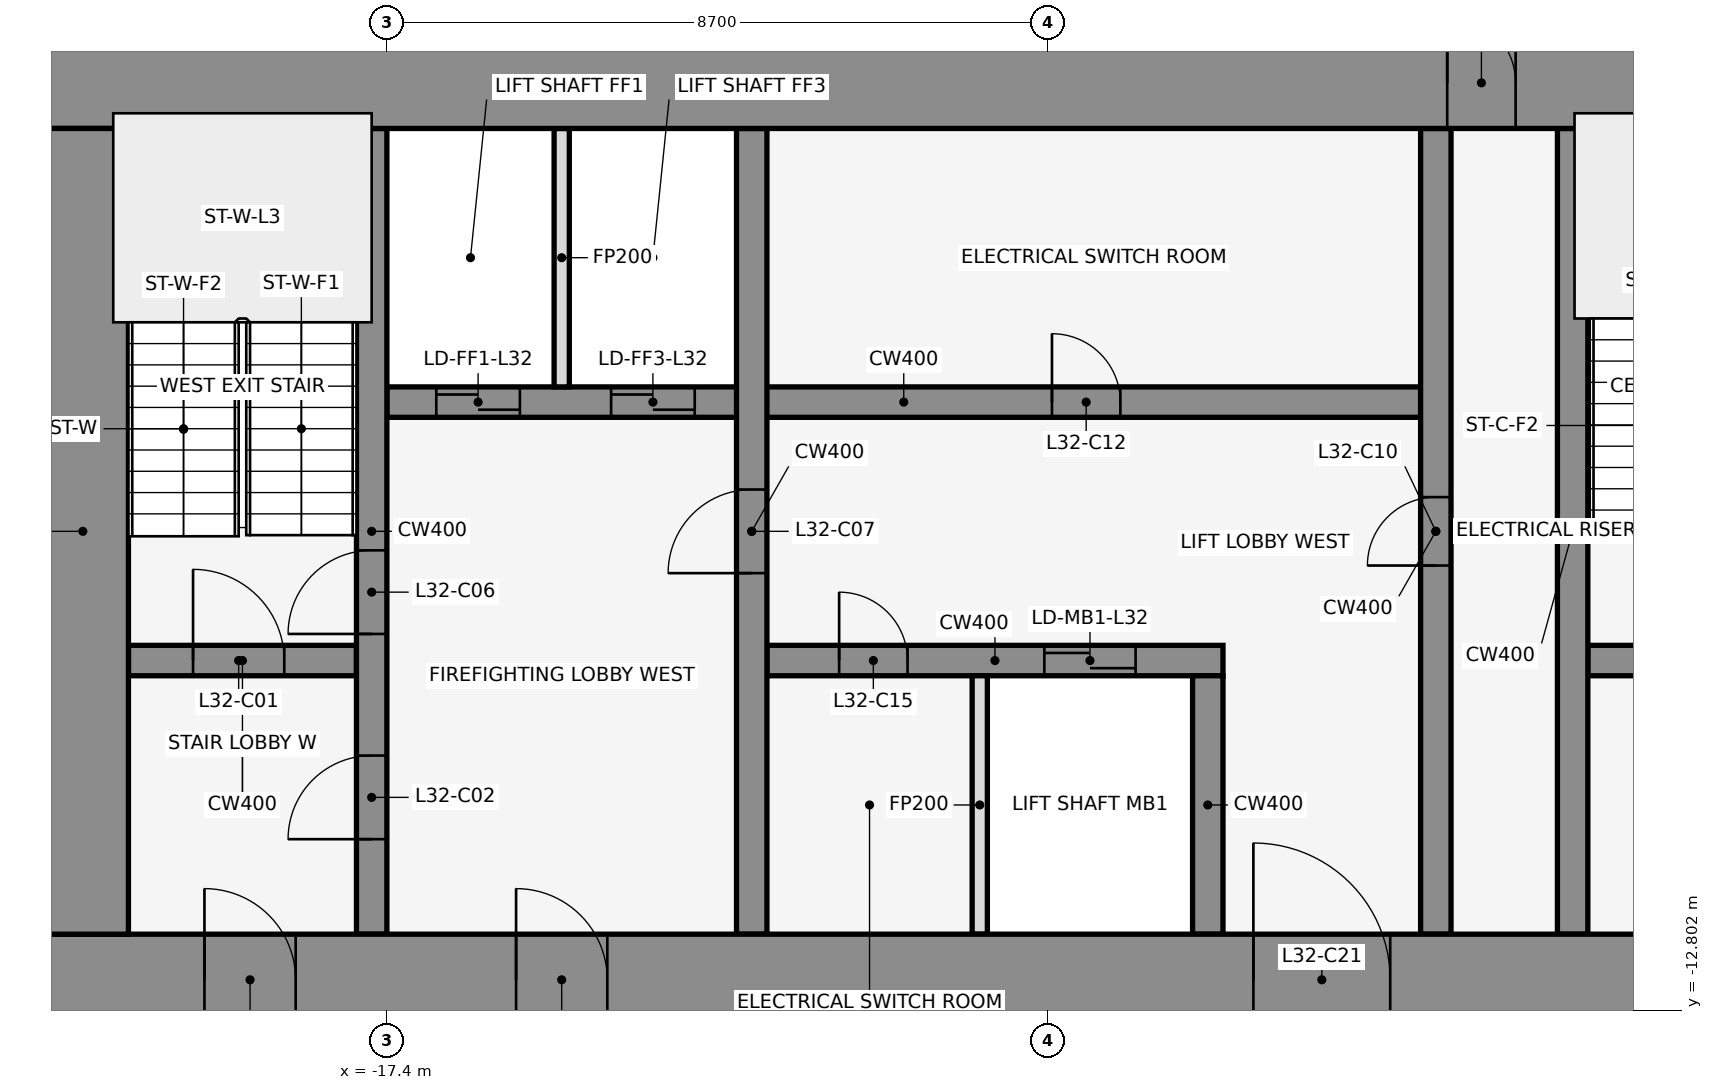
"""IFC4 building model, lengths in metres.
Left out: names, types, materials, properties, quantities, classifications, styles, units other than length and angle.
Written with IfcOpenShell. Run it as: python <this file> out.ifc"""

import sys

from ifc_helpers import new_model, si_unit, direction, frame, frame_2d, origin, place, context, subcontext, project, spatial, rectangle, extrude, element, fill, save


model = new_model("IFC4")
c1 = context("Model", 3, precision=1e-05, world=origin(), true_north=direction((0.0, 1.0)))
c2 = subcontext(c1, "Body", "Model", "MODEL_VIEW")
j1 = project(units=[si_unit("LENGTHUNIT", "METRE"), si_unit("PLANEANGLEUNIT", "RADIAN")], contexts=[c1])
p1 = place(None, origin())
s1 = spatial("IfcSite", under=j1, at=p1, CompositionType="ELEMENT")
p2 = place(p1, origin())
s2 = spatial("IfcBuilding", under=s1, at=p2, CompositionType="ELEMENT")
p3 = place(p2, frame((0.0, 0.0, 148.6)))
s3 = spatial("IfcBuildingStorey", under=s2, at=p3, CompositionType="ELEMENT", Elevation=148.6)
for number, where, z_axis, x_axis in (
    (1, (-0.068, -0.105, 0.0), (0.0, 0.0, 1.0), (-0.84, 0.543, 0.0)),
    (2, (-14.599, 1.08, 0.0), (0.0, 0.0, 1.0), (-0.84, -0.543, 0.0)),
):
    element("IfcWall", number, at=place(p3, frame(where, z_axis=z_axis, x_axis=x_axis)), inside=s3, PredefinedType="STANDARD", context=c2, shape_type="SweptSolid", body=[
        extrude(rectangle(XDim=2.183, YDim=0.25, at=frame_2d((1.091, 0.0))), origin(), (0.0, 0.0, 1.0), 3.95),
    ])
p4 = place(p3, frame((-20.8, -8.2, 0.0), z_axis=(0.0, 0.0, 1.0), x_axis=(1.0, 0.0, 0.0)))
e3 = element("IfcWall", 3, at=p4, inside=s3, PredefinedType="SHEAR", context=c2, shape_type="SweptSolid", body=[
    extrude(rectangle(XDim=3.0, YDim=0.4, at=frame_2d((1.5, 0.0))), origin(), (0.0, 0.0, 1.0), 4.1),
])
p5 = place(p4, frame((0.85, 0.0, 0.0)))
e4 = element("IfcOpeningElement", 4, at=p5, cuts=e3, PredefinedType="OPENING", context=c2, shape_type="SweptSolid", body=[
    extrude(rectangle(XDim=1.2, YDim=2.1, at=frame_2d((0.6, 1.05))), frame((0.0, 0.212, 0.0), z_axis=(0.0, -1.0, 0.0), x_axis=(1.0, 0.0, 0.0)), (0.0, 0.0, 1.0), 0.424),
])
p6 = place(p3, frame((-12.4, -8.2, 0.0), z_axis=(0.0, 0.0, 1.0), x_axis=(1.0, 0.0, 0.0)))
e5 = element("IfcWall", 5, at=p6, inside=s3, PredefinedType="SHEAR", context=c2, shape_type="SweptSolid", body=[
    extrude(rectangle(XDim=6.0, YDim=0.4, at=frame_2d((3.0, 0.0))), origin(), (0.0, 0.0, 1.0), 4.1),
])
p7 = place(p6, frame((3.65, 0.0, 0.0)))
e6 = element("IfcOpeningElement", 6, at=p7, cuts=e5, PredefinedType="OPENING", context=c2, shape_type="SweptSolid", body=[
    extrude(rectangle(XDim=1.2, YDim=2.1, at=frame_2d((0.6, 1.05))), frame((0.0, 0.212, 0.0), z_axis=(0.0, -1.0, 0.0), x_axis=(1.0, 0.0, 0.0)), (0.0, 0.0, 1.0), 0.424),
])
p8 = place(p6, frame((0.95, 0.0, 0.0)))
e7 = element("IfcOpeningElement", 7, at=p8, cuts=e5, PredefinedType="OPENING", context=c2, shape_type="SweptSolid", body=[
    extrude(rectangle(XDim=0.9, YDim=2.1, at=frame_2d((0.45, 1.05))), frame((0.0, 0.212, 0.0), z_axis=(0.0, -1.0, 0.0), x_axis=(1.0, 0.0, 0.0)), (0.0, 0.0, 1.0), 0.424),
])
p9 = place(p3, frame((-1.6, -8.2, 0.0), z_axis=(0.0, 0.0, 1.0), x_axis=(1.0, 0.0, 0.0)))
e8 = element("IfcWall", 8, at=p9, inside=s3, PredefinedType="SHEAR", context=c2, shape_type="SweptSolid", body=[
    extrude(rectangle(XDim=3.2, YDim=0.4, at=frame_2d((1.6, 0.0))), origin(), (0.0, 0.0, 1.0), 4.1),
])
p10 = place(p9, frame((1.05, 0.0, 0.0)))
e9 = element("IfcOpeningElement", 9, at=p10, cuts=e8, PredefinedType="OPENING", context=c2, shape_type="SweptSolid", body=[
    extrude(rectangle(XDim=1.2, YDim=2.1, at=frame_2d((0.6, 1.05))), frame((0.0, 0.212, 0.0), z_axis=(0.0, -1.0, 0.0), x_axis=(1.0, 0.0, 0.0)), (0.0, 0.0, 1.0), 0.424),
])
p11 = place(p3, frame((-17.4, -4.8, 0.0), z_axis=(0.0, 0.0, 1.0), x_axis=(1.0, 0.0, 0.0)))
e10 = element("IfcWall", 10, at=p11, inside=s3, PredefinedType="SHEAR", context=c2, shape_type="SweptSolid", body=[
    extrude(rectangle(XDim=13.6, YDim=0.4, at=frame_2d((6.8, 0.0))), origin(), (0.0, 0.0, 1.0), 4.1),
])
p12 = place(p11, frame((0.65, 0.0, 0.0)))
e11 = element("IfcOpeningElement", 11, at=p12, cuts=e10, PredefinedType="OPENING", context=c2, shape_type="SweptSolid", body=[
    extrude(rectangle(XDim=1.1, YDim=2.1, at=frame_2d((0.55, 1.05))), frame((0.0, 0.212, 0.0), z_axis=(0.0, -1.0, 0.0), x_axis=(1.0, 0.0, 0.0)), (0.0, 0.0, 1.0), 0.424),
])
p13 = place(p11, frame((2.95, 0.0, 0.0)))
e12 = element("IfcOpeningElement", 12, at=p13, cuts=e10, PredefinedType="OPENING", context=c2, shape_type="SweptSolid", body=[
    extrude(rectangle(XDim=1.1, YDim=2.1, at=frame_2d((0.55, 1.05))), frame((0.0, 0.212, 0.0), z_axis=(0.0, -1.0, 0.0), x_axis=(1.0, 0.0, 0.0)), (0.0, 0.0, 1.0), 0.424),
])
p14 = place(p11, frame((8.75, 0.0, 0.0)))
e13 = element("IfcOpeningElement", 13, at=p14, cuts=e10, PredefinedType="OPENING", context=c2, shape_type="SweptSolid", body=[
    extrude(rectangle(XDim=0.9, YDim=2.1, at=frame_2d((0.45, 1.05))), frame((0.0, 0.212, 0.0), z_axis=(0.0, -1.0, 0.0), x_axis=(1.0, 0.0, 0.0)), (0.0, 0.0, 1.0), 0.424),
])
p15 = place(p3, frame((-17.6, -11.8, 0.0), z_axis=(0.0, 0.0, 1.0), x_axis=(0.0, 1.0, 0.0)))
e14 = element("IfcWall", 14, at=p15, inside=s3, PredefinedType="SHEAR", context=c2, shape_type="SweptSolid", body=[
    extrude(rectangle(XDim=10.6, YDim=0.4, at=frame_2d((5.3, 0.0))), origin(), (0.0, 0.0, 1.0), 4.1),
])
p16 = place(p15, frame((1.25, 0.0, 0.0)))
e15 = element("IfcOpeningElement", 15, at=p16, cuts=e14, PredefinedType="OPENING", context=c2, shape_type="SweptSolid", body=[
    extrude(rectangle(XDim=1.1, YDim=2.1, at=frame_2d((0.55, 1.05))), frame((0.0, 0.212, 0.0), z_axis=(0.0, -1.0, 0.0), x_axis=(1.0, 0.0, 0.0)), (0.0, 0.0, 1.0), 0.424),
])
p17 = place(p15, frame((3.95, 0.0, 0.0)))
e16 = element("IfcOpeningElement", 16, at=p17, cuts=e14, PredefinedType="OPENING", context=c2, shape_type="SweptSolid", body=[
    extrude(rectangle(XDim=1.1, YDim=2.1, at=frame_2d((0.55, 1.05))), frame((0.0, 0.212, 0.0), z_axis=(0.0, -1.0, 0.0), x_axis=(1.0, 0.0, 0.0)), (0.0, 0.0, 1.0), 0.424),
])
p18 = place(p3, frame((-15.1, -4.6, 0.0), z_axis=(0.0, 0.0, 1.0), x_axis=(0.0, 1.0, 0.0)))
e17 = element("IfcWall", 17, at=p18, inside=s3, PredefinedType="PARTITIONING", context=c2, shape_type="SweptSolid", body=[
    extrude(rectangle(XDim=3.4, YDim=0.2, at=frame_2d((1.7, 0.0))), origin(), (0.0, 0.0, 1.0), 2.84),
])
p19 = place(p3, frame((-12.6, -11.8, 0.0), z_axis=(0.0, 0.0, 1.0), x_axis=(0.0, 1.0, 0.0)))
e18 = element("IfcWall", 18, at=p19, inside=s3, PredefinedType="SHEAR", context=c2, shape_type="SweptSolid", body=[
    extrude(rectangle(XDim=10.6, YDim=0.4, at=frame_2d((5.3, 0.0))), origin(), (0.0, 0.0, 1.0), 4.1),
])
p20 = place(p19, frame((4.75, 0.0, 0.0)))
e19 = element("IfcOpeningElement", 19, at=p20, cuts=e18, PredefinedType="OPENING", context=c2, shape_type="SweptSolid", body=[
    extrude(rectangle(XDim=1.1, YDim=2.1, at=frame_2d((0.55, 1.05))), frame((0.0, 0.212, 0.0), z_axis=(0.0, -1.0, 0.0), x_axis=(1.0, 0.0, 0.0)), (0.0, 0.0, 1.0), 0.424),
])
p21 = place(p3, frame((-9.6, -11.8, 0.0), z_axis=(0.0, 0.0, 1.0), x_axis=(0.0, 1.0, 0.0)))
e20 = element("IfcWall", 20, at=p21, inside=s3, PredefinedType="PARTITIONING", context=c2, shape_type="SweptSolid", body=[
    extrude(rectangle(XDim=3.4, YDim=0.2, at=frame_2d((1.7, 0.0))), origin(), (0.0, 0.0, 1.0), 2.84),
])
p22 = place(p3, frame((-6.6, -11.8, 0.0), z_axis=(0.0, 0.0, 1.0), x_axis=(0.0, 1.0, 0.0)))
e21 = element("IfcWall", 21, at=p22, inside=s3, PredefinedType="SHEAR", context=c2, shape_type="SweptSolid", body=[
    extrude(rectangle(XDim=3.4, YDim=0.4, at=frame_2d((1.7, 0.0))), origin(), (0.0, 0.0, 1.0), 4.1),
])
p23 = place(p3, frame((-3.6, -11.8, 0.0), z_axis=(0.0, 0.0, 1.0), x_axis=(0.0, 1.0, 0.0)))
e22 = element("IfcWall", 22, at=p23, inside=s3, PredefinedType="SHEAR", context=c2, shape_type="SweptSolid", body=[
    extrude(rectangle(XDim=10.6, YDim=0.4, at=frame_2d((5.3, 0.0))), origin(), (0.0, 0.0, 1.0), 4.1),
])
p24 = place(p23, frame((4.85, 0.0, 0.0)))
e23 = element("IfcOpeningElement", 23, at=p24, cuts=e22, PredefinedType="OPENING", context=c2, shape_type="SweptSolid", body=[
    extrude(rectangle(XDim=0.9, YDim=2.1, at=frame_2d((0.45, 1.05))), frame((0.0, 0.212, 0.0), z_axis=(0.0, -1.0, 0.0), x_axis=(1.0, 0.0, 0.0)), (0.0, 0.0, 1.0), 0.424),
])
p25 = place(p3, frame((-1.8, -11.8, 0.0), z_axis=(0.0, 0.0, 1.0), x_axis=(0.0, 1.0, 0.0)))
e24 = element("IfcWall", 24, at=p25, inside=s3, PredefinedType="SHEAR", context=c2, shape_type="SweptSolid", body=[
    extrude(rectangle(XDim=10.6, YDim=0.4, at=frame_2d((5.3, 0.0))), origin(), (0.0, 0.0, 1.0), 4.1),
])
p26 = place(p3, frame((-22.0, -0.6, 0.0), z_axis=(0.0, 0.0, 1.0), x_axis=(1.0, 0.0, 0.0)))
e25 = element("IfcWall", 25, at=p26, inside=s3, PredefinedType="SHEAR", context=c2, shape_type="SweptSolid", body=[
    extrude(rectangle(XDim=44.0, YDim=1.2, at=frame_2d((22.0, 0.0))), origin(), (0.0, 0.0, 1.0), 4.1),
])
p27 = place(p26, frame((18.55, 0.0, 0.0)))
e26 = element("IfcOpeningElement", 26, at=p27, cuts=e25, PredefinedType="OPENING", context=c2, shape_type="SweptSolid", body=[
    extrude(rectangle(XDim=0.9, YDim=2.1, at=frame_2d((0.45, 1.05))), frame((0.0, 0.612, 0.0), z_axis=(0.0, -1.0, 0.0), x_axis=(1.0, 0.0, 0.0)), (0.0, 0.0, 1.0), 1.224),
])
p28 = place(p26, frame((24.55, 0.0, 0.0)))
e27 = element("IfcOpeningElement", 27, at=p28, cuts=e25, PredefinedType="OPENING", context=c2, shape_type="SweptSolid", body=[
    extrude(rectangle(XDim=0.9, YDim=2.1, at=frame_2d((0.45, 1.05))), frame((0.0, 0.612, 0.0), z_axis=(0.0, -1.0, 0.0), x_axis=(1.0, 0.0, 0.0)), (0.0, 0.0, 1.0), 1.224),
])
p29 = place(p3, frame((-22.0, -12.4, 0.0), z_axis=(0.0, 0.0, 1.0), x_axis=(1.0, 0.0, 0.0)))
e28 = element("IfcWall", 28, at=p29, inside=s3, PredefinedType="SHEAR", context=c2, shape_type="SweptSolid", body=[
    extrude(rectangle(XDim=44.0, YDim=1.2, at=frame_2d((22.0, 0.0))), origin(), (0.0, 0.0, 1.0), 4.1),
])
p30 = place(p29, frame((2.2, 0.0, 0.0)))
e29 = element("IfcOpeningElement", 29, at=p30, cuts=e28, PredefinedType="OPENING", context=c2, shape_type="SweptSolid", body=[
    extrude(rectangle(XDim=1.2, YDim=2.1, at=frame_2d((0.6, 1.05))), frame((0.0, 0.612, 0.0), z_axis=(0.0, -1.0, 0.0), x_axis=(1.0, 0.0, 0.0)), (0.0, 0.0, 1.0), 1.224),
])
p31 = place(p29, frame((21.4, 0.0, 0.0)))
e30 = element("IfcOpeningElement", 30, at=p31, cuts=e28, PredefinedType="OPENING", context=c2, shape_type="SweptSolid", body=[
    extrude(rectangle(XDim=1.2, YDim=2.1, at=frame_2d((0.6, 1.05))), frame((0.0, 0.612, 0.0), z_axis=(0.0, -1.0, 0.0), x_axis=(1.0, 0.0, 0.0)), (0.0, 0.0, 1.0), 1.224),
])
p32 = place(p29, frame((40.6, 0.0, 0.0)))
e31 = element("IfcOpeningElement", 31, at=p32, cuts=e28, PredefinedType="OPENING", context=c2, shape_type="SweptSolid", body=[
    extrude(rectangle(XDim=1.2, YDim=2.1, at=frame_2d((0.6, 1.05))), frame((0.0, 0.612, 0.0), z_axis=(0.0, -1.0, 0.0), x_axis=(1.0, 0.0, 0.0)), (0.0, 0.0, 1.0), 1.224),
])
p33 = place(p29, frame((16.0, 0.0, 0.0)))
e32 = element("IfcOpeningElement", 32, at=p33, cuts=e28, PredefinedType="OPENING", context=c2, shape_type="SweptSolid", body=[
    extrude(rectangle(XDim=1.8, YDim=2.1, at=frame_2d((0.9, 1.05))), frame((0.0, 0.612, 0.0), z_axis=(0.0, -1.0, 0.0), x_axis=(1.0, 0.0, 0.0)), (0.0, 0.0, 1.0), 1.224),
])
p34 = place(p29, frame((6.3, 0.0, 0.0)))
e33 = element("IfcOpeningElement", 33, at=p34, cuts=e28, PredefinedType="OPENING", context=c2, shape_type="SweptSolid", body=[
    extrude(rectangle(XDim=1.2, YDim=2.1, at=frame_2d((0.6, 1.05))), frame((0.0, 0.612, 0.0), z_axis=(0.0, -1.0, 0.0), x_axis=(1.0, 0.0, 0.0)), (0.0, 0.0, 1.0), 1.224),
])
p35 = place(p29, frame((26.2, 0.0, 0.0)))
e34 = element("IfcOpeningElement", 34, at=p35, cuts=e28, PredefinedType="OPENING", context=c2, shape_type="SweptSolid", body=[
    extrude(rectangle(XDim=1.8, YDim=2.1, at=frame_2d((0.9, 1.05))), frame((0.0, 0.612, 0.0), z_axis=(0.0, -1.0, 0.0), x_axis=(1.0, 0.0, 0.0)), (0.0, 0.0, 1.0), 1.224),
])
p36 = place(p29, frame((36.5, 0.0, 0.0)))
e35 = element("IfcOpeningElement", 35, at=p36, cuts=e28, PredefinedType="OPENING", context=c2, shape_type="SweptSolid", body=[
    extrude(rectangle(XDim=1.2, YDim=2.1, at=frame_2d((0.6, 1.05))), frame((0.0, 0.612, 0.0), z_axis=(0.0, -1.0, 0.0), x_axis=(1.0, 0.0, 0.0)), (0.0, 0.0, 1.0), 1.224),
])
p37 = place(p3, frame((-21.4, -11.8, 0.0), z_axis=(0.0, 0.0, 1.0), x_axis=(0.0, 1.0, 0.0)))
e36 = element("IfcWall", 36, at=p37, inside=s3, PredefinedType="SHEAR", context=c2, shape_type="SweptSolid", body=[
    extrude(rectangle(XDim=10.6, YDim=1.2, at=frame_2d((5.3, 0.0))), origin(), (0.0, 0.0, 1.0), 4.1),
])
p38 = place(p5, origin())
e37 = element("IfcDoor", 37, at=p38, inside=s3, OperationType="SINGLE_SWING_LEFT", PredefinedType="DOOR", context=c2, shape_type="SweptSolid", body=[
    extrude(rectangle(XDim=1.2, YDim=2.1, at=frame_2d((0.6, 1.05))), frame((0.0, 0.025, 0.0), z_axis=(0.0, -1.0, 0.0), x_axis=(1.0, 0.0, 0.0)), (0.0, 0.0, 1.0), 0.05),
])
fill(e4, e37)
p39 = place(p16, frame((1.1, 0.0, 0.0), z_axis=(0.0, 0.0, 1.0), x_axis=(-1.0, 0.0, 0.0)))
e38 = element("IfcDoor", 38, at=p39, inside=s3, OperationType="SINGLE_SWING_LEFT", PredefinedType="DOOR", context=c2, shape_type="SweptSolid", body=[
    extrude(rectangle(XDim=1.1, YDim=2.1, at=frame_2d((0.55, 1.05))), frame((0.0, 0.025, 0.0), z_axis=(0.0, -1.0, 0.0), x_axis=(1.0, 0.0, 0.0)), (0.0, 0.0, 1.0), 0.05),
])
fill(e15, e38)
p40 = place(p12, origin())
e39 = element("IfcDoor", 39, at=p40, inside=s3, OperationType="DOUBLE_DOOR_SLIDING", PredefinedType="DOOR", context=c2, shape_type="SweptSolid", body=[
    extrude(rectangle(XDim=1.1, YDim=2.1, at=frame_2d((0.55, 1.05))), frame((0.0, 0.025, 0.0), z_axis=(0.0, -1.0, 0.0), x_axis=(1.0, 0.0, 0.0)), (0.0, 0.0, 1.0), 0.05),
])
fill(e11, e39)
p41 = place(p13, origin())
e40 = element("IfcDoor", 40, at=p41, inside=s3, OperationType="DOUBLE_DOOR_SLIDING", PredefinedType="DOOR", context=c2, shape_type="SweptSolid", body=[
    extrude(rectangle(XDim=1.1, YDim=2.1, at=frame_2d((0.55, 1.05))), frame((0.0, 0.025, 0.0), z_axis=(0.0, -1.0, 0.0), x_axis=(1.0, 0.0, 0.0)), (0.0, 0.0, 1.0), 0.05),
])
fill(e12, e40)
p42 = place(p7, origin())
e41 = element("IfcDoor", 41, at=p42, inside=s3, OperationType="DOUBLE_DOOR_SLIDING", PredefinedType="DOOR", context=c2, shape_type="SweptSolid", body=[
    extrude(rectangle(XDim=1.2, YDim=2.1, at=frame_2d((0.6, 1.05))), frame((0.0, 0.025, 0.0), z_axis=(0.0, -1.0, 0.0), x_axis=(1.0, 0.0, 0.0)), (0.0, 0.0, 1.0), 0.05),
])
fill(e6, e41)
p43 = place(p17, frame((1.1, 0.0, 0.0), z_axis=(0.0, 0.0, 1.0), x_axis=(-1.0, 0.0, 0.0)))
e42 = element("IfcDoor", 42, at=p43, inside=s3, OperationType="SINGLE_SWING_LEFT", PredefinedType="DOOR", context=c2, shape_type="SweptSolid", body=[
    extrude(rectangle(XDim=1.1, YDim=2.1, at=frame_2d((0.55, 1.05))), frame((0.0, 0.025, 0.0), z_axis=(0.0, -1.0, 0.0), x_axis=(1.0, 0.0, 0.0)), (0.0, 0.0, 1.0), 0.05),
])
fill(e16, e42)
p44 = place(p20, origin())
e43 = element("IfcDoor", 43, at=p44, inside=s3, OperationType="SINGLE_SWING_LEFT", PredefinedType="DOOR", context=c2, shape_type="SweptSolid", body=[
    extrude(rectangle(XDim=1.1, YDim=2.1, at=frame_2d((0.55, 1.05))), frame((0.0, 0.025, 0.0), z_axis=(0.0, -1.0, 0.0), x_axis=(1.0, 0.0, 0.0)), (0.0, 0.0, 1.0), 0.05),
])
fill(e19, e43)
p45 = place(p24, frame((0.9, 0.0, 0.0), z_axis=(0.0, 0.0, 1.0), x_axis=(-1.0, 0.0, 0.0)))
e44 = element("IfcDoor", 44, at=p45, inside=s3, OperationType="SINGLE_SWING_LEFT", PredefinedType="DOOR", context=c2, shape_type="SweptSolid", body=[
    extrude(rectangle(XDim=0.9, YDim=2.1, at=frame_2d((0.45, 1.05))), frame((0.0, 0.025, 0.0), z_axis=(0.0, -1.0, 0.0), x_axis=(1.0, 0.0, 0.0)), (0.0, 0.0, 1.0), 0.05),
])
fill(e23, e44)
p46 = place(p14, origin())
e45 = element("IfcDoor", 45, at=p46, inside=s3, OperationType="SINGLE_SWING_RIGHT", PredefinedType="DOOR", context=c2, shape_type="SweptSolid", body=[
    extrude(rectangle(XDim=0.9, YDim=2.1, at=frame_2d((0.45, 1.05))), frame((0.0, 0.025, 0.0), z_axis=(0.0, -1.0, 0.0), x_axis=(1.0, 0.0, 0.0)), (0.0, 0.0, 1.0), 0.05),
])
fill(e13, e45)
p47 = place(p8, frame((0.9, 0.0, 0.0), z_axis=(0.0, 0.0, 1.0), x_axis=(-1.0, 0.0, 0.0)))
e46 = element("IfcDoor", 46, at=p47, inside=s3, OperationType="SINGLE_SWING_RIGHT", PredefinedType="DOOR", context=c2, shape_type="SweptSolid", body=[
    extrude(rectangle(XDim=0.9, YDim=2.1, at=frame_2d((0.45, 1.05))), frame((0.0, 0.025, 0.0), z_axis=(0.0, -1.0, 0.0), x_axis=(1.0, 0.0, 0.0)), (0.0, 0.0, 1.0), 0.05),
])
fill(e7, e46)
p48 = place(p27, origin())
e47 = element("IfcDoor", 47, at=p48, inside=s3, OperationType="SINGLE_SWING_LEFT", PredefinedType="DOOR", context=c2, shape_type="SweptSolid", body=[
    extrude(rectangle(XDim=0.9, YDim=2.1, at=frame_2d((0.45, 1.05))), frame((0.0, 0.025, 0.0), z_axis=(0.0, -1.0, 0.0), x_axis=(1.0, 0.0, 0.0)), (0.0, 0.0, 1.0), 0.05),
])
fill(e26, e47)
p49 = place(p30, frame((1.2, 0.0, 0.0), z_axis=(0.0, 0.0, 1.0), x_axis=(-1.0, 0.0, 0.0)))
e48 = element("IfcDoor", 48, at=p49, inside=s3, OperationType="SINGLE_SWING_RIGHT", PredefinedType="DOOR", context=c2, shape_type="SweptSolid", body=[
    extrude(rectangle(XDim=1.2, YDim=2.1, at=frame_2d((0.6, 1.05))), frame((0.0, 0.025, 0.0), z_axis=(0.0, -1.0, 0.0), x_axis=(1.0, 0.0, 0.0)), (0.0, 0.0, 1.0), 0.05),
])
fill(e29, e48)
p50 = place(p33, origin())
e49 = element("IfcDoor", 49, at=p50, inside=s3, OperationType="SINGLE_SWING_LEFT", PredefinedType="DOOR", context=c2, shape_type="SweptSolid", body=[
    extrude(rectangle(XDim=1.8, YDim=2.1, at=frame_2d((0.9, 1.05))), frame((0.0, 0.025, 0.0), z_axis=(0.0, -1.0, 0.0), x_axis=(1.0, 0.0, 0.0)), (0.0, 0.0, 1.0), 0.05),
])
fill(e32, e49)
p51 = place(p34, frame((1.2, 0.0, 0.0), z_axis=(0.0, 0.0, 1.0), x_axis=(-1.0, 0.0, 0.0)))
e50 = element("IfcDoor", 50, at=p51, inside=s3, OperationType="SINGLE_SWING_RIGHT", PredefinedType="DOOR", context=c2, shape_type="SweptSolid", body=[
    extrude(rectangle(XDim=1.2, YDim=2.1, at=frame_2d((0.6, 1.05))), frame((0.0, 0.025, 0.0), z_axis=(0.0, -1.0, 0.0), x_axis=(1.0, 0.0, 0.0)), (0.0, 0.0, 1.0), 0.05),
])
fill(e33, e50)
save(model, sys.argv[1])
